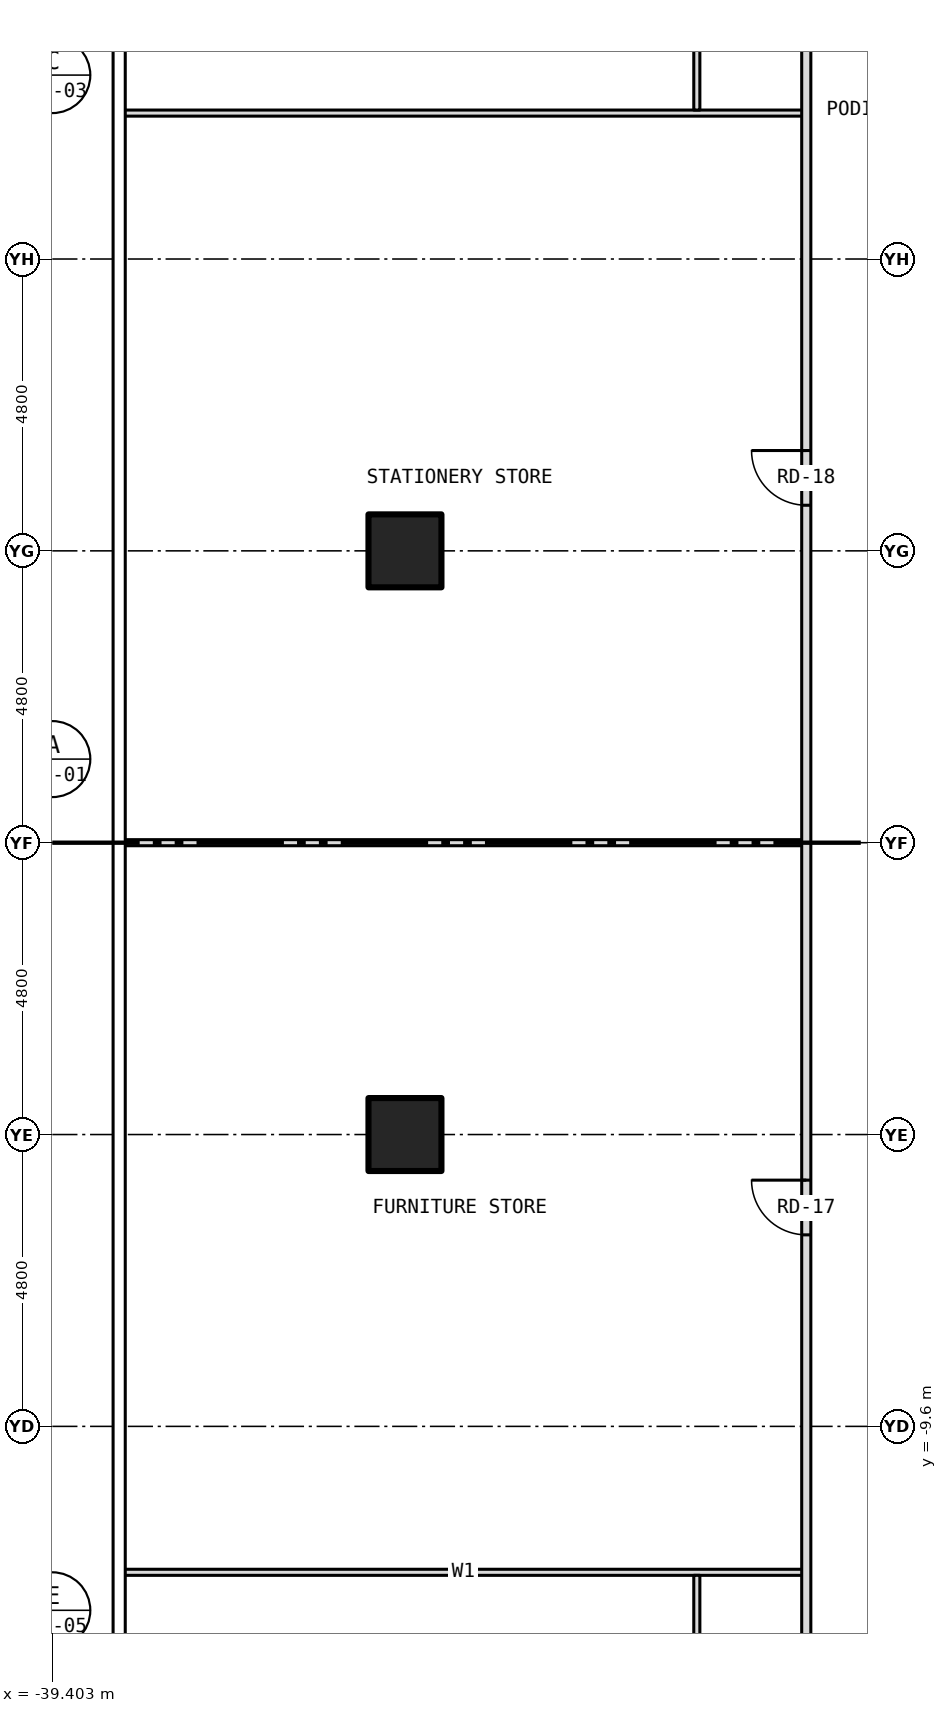
"""IFC4 building model, lengths in metres.
Left out: names, types, materials, properties, quantities, classifications, styles, units other than length and angle.
Written with IfcOpenShell. Run it as: python <this file> out.ifc"""

import sys

from ifc_helpers import new_model, si_unit, direction, frame, frame_2d, origin, origin_2d, place, context, subcontext, project, spatial, rectangle, hollow_rectangle, extrude, element, fill, save


model = new_model("IFC4")
c1 = context("Model", 3, precision=1e-05, world=origin(), true_north=direction((0.0, 1.0)))
c2 = subcontext(c1, "Body", "Model", "MODEL_VIEW")
j1 = project(units=[si_unit("LENGTHUNIT", "METRE"), si_unit("PLANEANGLEUNIT", "RADIAN")], contexts=[c1])
p1 = place(None, origin())
s1 = spatial("IfcSite", under=j1, at=p1, CompositionType="ELEMENT")
p2 = place(p1, origin())
s2 = spatial("IfcBuilding", under=s1, at=p2, CompositionType="ELEMENT")
p3 = place(p2, frame((0.0, 0.0, 15.5)))
s3 = spatial("IfcBuildingStorey", under=s2, at=p3, CompositionType="ELEMENT", Elevation=15.5)
for number, where, z_axis, x_axis in (
    (1, (-33.6, -4.8, -0.2), (0.0, 0.0, 1.0), (1.0, 0.0, 0.0)),
    (2, (-33.6, 4.8, -0.2), (0.0, 0.0, 1.0), (1.0, 0.0, 0.0)),
):
    element("IfcColumn", number, at=place(p3, frame(where, z_axis=z_axis, x_axis=x_axis)), inside=s3, PredefinedType="COLUMN", context=c2, shape_type="SweptSolid", body=[
        extrude(hollow_rectangle(XDim=1.2, YDim=1.2, WallThickness=0.07, at=origin_2d()), origin(), (0.0, 0.0, 1.0), 4.5),
    ])
for number, where, z_axis, x_axis in (
    (3, (-38.28, -12.0, 0.0), (0.0, 0.0, 1.0), (1.0, 0.0, 0.0)),
    (4, (-38.28, 0.0, 0.0), (0.0, 0.0, 1.0), (1.0, 0.0, 0.0)),
    (5, (-38.28, 12.0, 0.0), (0.0, 0.0, 1.0), (1.0, 0.0, 0.0)),
):
    element("IfcWall", number, at=place(p3, frame(where, z_axis=z_axis, x_axis=x_axis)), inside=s3, PredefinedType="PARTITIONING", context=c2, shape_type="SweptSolid", body=[
        extrude(rectangle(XDim=11.28, YDim=0.1, at=frame_2d((5.64, 0.0))), origin(), (0.0, 0.0, 1.0), 4.3),
    ])
for number, where, z_axis, x_axis in (
    (6, (-28.8, -14.246, 0.0), (0.0, 0.0, 1.0), (0.0, 1.0, 0.0)),
    (7, (-28.8, 12.05, 0.0), (0.0, 0.0, 1.0), (0.0, 1.0, 0.0)),
):
    element("IfcWall", number, at=place(p3, frame(where, z_axis=z_axis, x_axis=x_axis)), inside=s3, PredefinedType="PARTITIONING", context=c2, shape_type="SweptSolid", body=[
        extrude(rectangle(XDim=2.196, YDim=0.1, at=frame_2d((1.098, 0.0))), origin(), (0.0, 0.0, 1.0), 3.683),
    ])
p4 = place(p3, frame((-27.0, -13.725, 0.0), z_axis=(0.0, 0.0, 1.0), x_axis=(0.0, 1.0, 0.0)))
e8 = element("IfcWall", 8, at=p4, inside=s3, PredefinedType="PARTITIONING", context=c2, shape_type="SweptSolid", body=[
    extrude(rectangle(XDim=27.45, YDim=0.15, at=frame_2d((13.725, 0.0))), origin(), (0.0, 0.0, 1.0), 4.3),
])
p5 = place(p4, frame((7.275, 0.0, 0.0)))
e9 = element("IfcOpeningElement", 9, at=p5, cuts=e8, PredefinedType="OPENING", context=c2, shape_type="SweptSolid", body=[
    extrude(rectangle(XDim=0.9, YDim=2.1, at=frame_2d((0.45, 1.05))), frame((0.0, 0.087, 0.0), z_axis=(0.0, -1.0, 0.0), x_axis=(1.0, 0.0, 0.0)), (0.0, 0.0, 1.0), 0.174),
])
p6 = place(p4, frame((19.275, 0.0, 0.0)))
e10 = element("IfcOpeningElement", 10, at=p6, cuts=e8, PredefinedType="OPENING", context=c2, shape_type="SweptSolid", body=[
    extrude(rectangle(XDim=0.9, YDim=2.1, at=frame_2d((0.45, 1.05))), frame((0.0, 0.087, 0.0), z_axis=(0.0, -1.0, 0.0), x_axis=(1.0, 0.0, 0.0)), (0.0, 0.0, 1.0), 0.174),
])
p7 = place(p5, origin())
e11 = element("IfcDoor", 11, at=p7, inside=s3, OperationType="SINGLE_SWING_RIGHT", PredefinedType="DOOR", context=c2, shape_type="SweptSolid", body=[
    extrude(rectangle(XDim=0.9, YDim=2.1, at=frame_2d((0.45, 1.05))), frame((0.0, 0.025, 0.0), z_axis=(0.0, -1.0, 0.0), x_axis=(1.0, 0.0, 0.0)), (0.0, 0.0, 1.0), 0.05),
])
fill(e9, e11)
p8 = place(p6, origin())
e12 = element("IfcDoor", 12, at=p8, inside=s3, OperationType="SINGLE_SWING_RIGHT", PredefinedType="DOOR", context=c2, shape_type="SweptSolid", body=[
    extrude(rectangle(XDim=0.9, YDim=2.1, at=frame_2d((0.45, 1.05))), frame((0.0, 0.025, 0.0), z_axis=(0.0, -1.0, 0.0), x_axis=(1.0, 0.0, 0.0)), (0.0, 0.0, 1.0), 0.05),
])
fill(e10, e12)
save(model, sys.argv[1])
